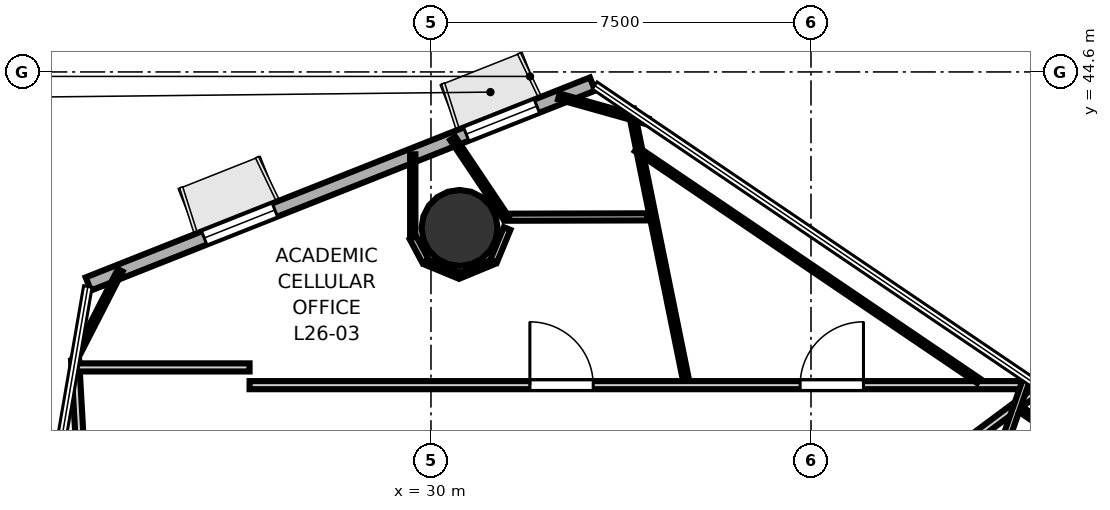
"""IFC4 building model, lengths in metres.
Left out: names, types, materials, properties, quantities, classifications, styles, units other than length and angle.
Written with IfcOpenShell. Run it as: python <this file> out.ifc"""

import sys

from ifc_helpers import new_model, si_unit, direction, frame, frame_2d, origin, origin_2d, place, context, subcontext, project, spatial, rectangle, hollow_circle, extrude, element, fill, save


model = new_model("IFC4")
c1 = context("Model", 3, precision=1e-05, world=origin(), true_north=direction((0.0, 1.0)))
c2 = subcontext(c1, "Body", "Model", "MODEL_VIEW")
j1 = project(units=[si_unit("LENGTHUNIT", "METRE"), si_unit("PLANEANGLEUNIT", "RADIAN")], contexts=[c1])
p1 = place(None, origin())
s1 = spatial("IfcSite", under=j1, at=p1, CompositionType="ELEMENT")
p2 = place(p1, origin())
s2 = spatial("IfcBuilding", under=s1, at=p2, CompositionType="ELEMENT")
p3 = place(p2, frame((0.0, 0.0, 105.2)))
s3 = spatial("IfcBuildingStorey", under=s2, at=p3, CompositionType="ELEMENT", Elevation=105.2)
p4 = place(p3, frame((30.564, 41.521, 0.0), z_axis=(0.0, 0.0, 1.0), x_axis=(1.0, 0.0, 0.0)))
e1 = element("IfcColumn", 1, at=p4, inside=s3, PredefinedType="COLUMN", context=c2, shape_type="SweptSolid", body=[
    extrude(hollow_circle(Radius=0.75, WallThickness=0.036, at=origin_2d()), origin(), (0.0, 0.0, 1.0), 3.7),
])
p5 = place(p3, frame((33.188, 44.361, 0.0), z_axis=(0.0, 0.0, 1.0), x_axis=(-0.929607947385, -0.368549947983, 0.0)))
e2 = element("IfcWall", 2, at=p5, inside=s3, PredefinedType="SOLIDWALL", context=c2, shape_type="SweptSolid", body=[
    extrude(rectangle(XDim=10.705, YDim=0.28, at=frame_2d((5.353, 0.0))), origin(), (0.0, 0.0, 1.0), 3.52),
])
p6 = place(p5, frame((1.181, 0.0, 0.85)))
e3 = element("IfcOpeningElement", 3, at=p6, cuts=e2, PredefinedType="OPENING", context=c2, shape_type="SweptSolid", body=[
    extrude(rectangle(XDim=1.5, YDim=2.1, at=frame_2d((0.75, 1.05))), frame((0.0, 0.15, 0.0), z_axis=(0.0, -1.0, 0.0), x_axis=(1.0, 0.0, 0.0)), (0.0, 0.0, 1.0), 0.3),
])
p7 = place(p5, frame((6.743, 0.0, 0.85)))
e4 = element("IfcOpeningElement", 4, at=p7, cuts=e2, PredefinedType="OPENING", context=c2, shape_type="SweptSolid", body=[
    extrude(rectangle(XDim=1.5, YDim=2.1, at=frame_2d((0.75, 1.05))), frame((0.0, 0.15, 0.0), z_axis=(0.0, -1.0, 0.0), x_axis=(1.0, 0.0, 0.0)), (0.0, 0.0, 1.0), 0.3),
])
p8 = place(p3, frame((23.581, 28.307, 0.0), z_axis=(0.0, 0.0, 1.0), x_axis=(-0.056927299401, 0.998378326379, 0.0)))
e5 = element("IfcWall", 5, at=p8, inside=s3, PredefinedType="PARTITIONING", context=c2, shape_type="SweptSolid", body=[
    extrude(rectangle(XDim=10.615, YDim=0.16, at=frame_2d((5.307, 0.0))), origin(), (0.0, 0.0, 1.0), 2.84),
])
p9 = place(p8, frame((3.594, 0.0, 0.0)))
e6 = element("IfcOpeningElement", 6, at=p9, cuts=e5, PredefinedType="OPENING", context=c2, shape_type="SweptSolid", body=[
    extrude(rectangle(XDim=1.25, YDim=2.2, at=frame_2d((0.625, 1.1))), frame((0.0, 0.09, 0.0), z_axis=(0.0, -1.0, 0.0), x_axis=(1.0, 0.0, 0.0)), (0.0, 0.0, 1.0), 0.18),
])
p10 = place(p3, frame((22.934, 38.769, 0.0), z_axis=(0.0, 0.0, 1.0), x_axis=(1.0, 0.0, 0.0)))
e7 = element("IfcWall", 7, at=p10, inside=s3, PredefinedType="PARTITIONING", context=c2, shape_type="SweptSolid", body=[
    extrude(rectangle(XDim=3.486, YDim=0.16, at=frame_2d((1.743, 0.0))), origin(), (0.0, 0.0, 1.0), 2.84),
])
p11 = place(p3, frame((26.42, 38.419, 0.0), z_axis=(0.0, 0.0, 1.0), x_axis=(1.0, 0.0, 0.0)))
e8 = element("IfcWall", 8, at=p11, inside=s3, PredefinedType="PARTITIONING", context=c2, shape_type="SweptSolid", body=[
    extrude(rectangle(XDim=15.56, YDim=0.16, at=frame_2d((7.78, 0.0))), origin(), (0.0, 0.0, 1.0), 2.84),
])
p12 = place(p11, frame((10.865, 0.0, 0.0)))
e9 = element("IfcOpeningElement", 9, at=p12, cuts=e8, PredefinedType="OPENING", context=c2, shape_type="SweptSolid", body=[
    extrude(rectangle(XDim=1.25, YDim=2.2, at=frame_2d((0.625, 1.1))), frame((0.0, 0.09, 0.0), z_axis=(0.0, -1.0, 0.0), x_axis=(1.0, 0.0, 0.0)), (0.0, 0.0, 1.0), 0.18),
])
p13 = place(p11, frame((5.532, 0.0, 0.0)))
e10 = element("IfcOpeningElement", 10, at=p13, cuts=e8, PredefinedType="OPENING", context=c2, shape_type="SweptSolid", body=[
    extrude(rectangle(XDim=1.25, YDim=2.2, at=frame_2d((0.625, 1.1))), frame((0.0, 0.09, 0.0), z_axis=(0.0, -1.0, 0.0), x_axis=(1.0, 0.0, 0.0)), (0.0, 0.0, 1.0), 0.18),
])
p14 = place(p3, frame((42.053, 38.379, 0.0), z_axis=(0.0, 0.0, 1.0), x_axis=(-0.802246834953, -0.596992475504, 0.0)))
e11 = element("IfcWall", 11, at=p14, inside=s3, PredefinedType="PARTITIONING", context=c2, shape_type="SweptSolid", body=[
    extrude(rectangle(XDim=2.796, YDim=0.16, at=frame_2d((1.398, 0.0))), origin(), (0.0, 0.0, 1.0), 2.84),
])
p15 = place(p3, frame((41.122, 36.72, 0.0), z_axis=(0.0, 0.0, 1.0), x_axis=(0.329225111587, 0.944251463277, 0.0)))
e12 = element("IfcWall", 12, at=p15, inside=s3, PredefinedType="PARTITIONING", context=c2, shape_type="SweptSolid", body=[
    extrude(rectangle(XDim=1.962, YDim=0.14, at=frame_2d((0.981, 0.0))), origin(), (0.0, 0.0, 1.0), 2.84),
])
p16 = place(p3, frame((41.65, 37.933, 0.0), z_axis=(0.0, 0.0, 1.0), x_axis=(0.827941747022, -0.560814107827, 0.0)))
e13 = element("IfcWall", 13, at=p16, inside=s3, PredefinedType="PARTITIONING", context=c2, shape_type="SweptSolid", body=[
    extrude(rectangle(XDim=11.895, YDim=0.12, at=frame_2d((5.948, 0.0))), origin(), (0.0, 0.0, 1.0), 2.84),
])
p17 = place(p3, frame((35.029, 38.536, 0.0), z_axis=(0.0, 0.0, 1.0), x_axis=(-0.198965568746, 0.980006480822, 0.0)))
e14 = element("IfcWall", 14, at=p17, inside=s3, PredefinedType="PARTITIONING", context=c2, shape_type="SweptSolid", body=[
    extrude(rectangle(XDim=5.436, YDim=0.12, at=frame_2d((2.718, 0.0))), origin(), (0.0, 0.0, 1.0), 2.84),
])
p18 = place(p3, frame((34.052, 43.08, 0.0), z_axis=(0.0, 0.0, 1.0), x_axis=(0.827934826591, -0.560824324471, 0.0)))
e15 = element("IfcWall", 15, at=p18, inside=s3, PredefinedType="PARTITIONING", context=c2, shape_type="SweptSolid", body=[
    extrude(rectangle(XDim=8.158, YDim=0.105, at=frame_2d((4.079, 0.0))), origin(), (0.0, 0.0, 1.0), 2.84),
])
p19 = place(p3, frame((22.988, 38.968, 0.0), z_axis=(0.0, 0.0, 1.0), x_axis=(0.456105833623, 0.889925541006, 0.0)))
e16 = element("IfcWall", 16, at=p19, inside=s3, PredefinedType="PARTITIONING", context=c2, shape_type="SweptSolid", body=[
    extrude(rectangle(XDim=1.928, YDim=0.105, at=frame_2d((0.964, 0.0))), origin(), (0.0, 0.0, 1.0), 2.84),
])
p20 = place(p3, frame((32.524, 44.115, 0.0), z_axis=(0.0, 0.0, 1.0), x_axis=(0.962878976212, -0.269933468042, 0.0)))
e17 = element("IfcWall", 17, at=p20, inside=s3, PredefinedType="PARTITIONING", context=c2, shape_type="SweptSolid", body=[
    extrude(rectangle(XDim=1.82, YDim=0.12, at=frame_2d((0.91, 0.0))), origin(), (0.0, 0.0, 1.0), 2.84),
])
p21 = place(p3, frame((34.267, 41.74, 0.0), z_axis=(0.0, 0.0, 1.0), x_axis=(-0.999996830361, -0.002517790248, 0.0)))
e18 = element("IfcWall", 18, at=p21, inside=s3, PredefinedType="PARTITIONING", context=c2, shape_type="SweptSolid", body=[
    extrude(rectangle(XDim=2.812, YDim=0.14, at=frame_2d((1.406, 0.0))), origin(), (0.0, 0.0, 1.0), 2.84),
])
p22 = place(p3, frame((31.481, 41.719, 0.0), z_axis=(0.0, 0.0, 1.0), x_axis=(-0.556846029643, 0.830615735025, 0.0)))
e19 = element("IfcWall", 19, at=p22, inside=s3, PredefinedType="PARTITIONING", context=c2, shape_type="SweptSolid", body=[
    extrude(rectangle(XDim=1.889, YDim=0.12, at=frame_2d((0.944, 0.0))), origin(), (0.0, 0.0, 1.0), 2.84),
])
p23 = place(p3, frame((29.64, 42.974, 0.0), z_axis=(0.0, 0.0, 1.0), x_axis=(0.0, -1.0, 0.0)))
e20 = element("IfcWall", 20, at=p23, inside=s3, PredefinedType="PARTITIONING", context=c2, shape_type="SweptSolid", body=[
    extrude(rectangle(XDim=1.631, YDim=0.105, at=frame_2d((0.815, 0.0))), origin(), (0.0, 0.0, 1.0), 2.84),
])
p24 = place(p3, frame((29.644, 41.329, 0.0), z_axis=(0.0, 0.0, 1.0), x_axis=(0.471618839574, -0.881802511994, 0.0)))
e21 = element("IfcWall", 21, at=p24, inside=s3, PredefinedType="PARTITIONING", context=c2, shape_type="SweptSolid", body=[
    extrude(rectangle(XDim=0.529, YDim=0.14, at=frame_2d((0.264, 0.0))), origin(), (0.0, 0.0, 1.0), 2.84),
])
p25 = place(p3, frame((29.909, 40.849, 0.0), z_axis=(0.0, 0.0, 1.0), x_axis=(0.923935648299, -0.382547928764, 0.0)))
e22 = element("IfcWall", 22, at=p25, inside=s3, PredefinedType="PARTITIONING", context=c2, shape_type="SweptSolid", body=[
    extrude(rectangle(XDim=0.696, YDim=0.12, at=frame_2d((0.348, 0.0))), origin(), (0.0, 0.0, 1.0), 2.84),
])
p26 = place(p3, frame((30.576, 40.583, 0.0), z_axis=(0.0, 0.0, 1.0), x_axis=(0.923935648299, 0.382547928764, 0.0)))
e23 = element("IfcWall", 23, at=p26, inside=s3, PredefinedType="PARTITIONING", context=c2, shape_type="SweptSolid", body=[
    extrude(rectangle(XDim=0.696, YDim=0.105, at=frame_2d((0.348, 0.0))), origin(), (0.0, 0.0, 1.0), 2.84),
])
p27 = place(p3, frame((31.236, 40.866, 0.0), z_axis=(0.0, 0.0, 1.0), x_axis=(0.381929177829, 0.92419159438, 0.0)))
e24 = element("IfcWall", 24, at=p27, inside=s3, PredefinedType="PARTITIONING", context=c2, shape_type="SweptSolid", body=[
    extrude(rectangle(XDim=0.698, YDim=0.14, at=frame_2d((0.349, 0.0))), origin(), (0.0, 0.0, 1.0), 2.84),
])
p28 = place(p12, origin())
e25 = element("IfcDoor", 25, at=p28, inside=s3, OperationType="SINGLE_SWING_RIGHT", PredefinedType="DOOR", context=c2, shape_type="SweptSolid", body=[
    extrude(rectangle(XDim=1.25, YDim=2.2, at=frame_2d((0.625, 1.1))), frame((0.0, 0.025, 0.0), z_axis=(0.0, -1.0, 0.0), x_axis=(1.0, 0.0, 0.0)), (0.0, 0.0, 1.0), 0.05),
])
fill(e9, e25)
p29 = place(p13, origin())
e26 = element("IfcDoor", 26, at=p29, inside=s3, OperationType="SINGLE_SWING_LEFT", PredefinedType="DOOR", context=c2, shape_type="SweptSolid", body=[
    extrude(rectangle(XDim=1.25, YDim=2.2, at=frame_2d((0.625, 1.1))), frame((0.0, 0.025, 0.0), z_axis=(0.0, -1.0, 0.0), x_axis=(1.0, 0.0, 0.0)), (0.0, 0.0, 1.0), 0.05),
])
fill(e10, e26)
p30 = place(p6, origin())
e27 = element("IfcWindow", 27, at=p30, inside=s3, PartitioningType="SINGLE_PANEL", PredefinedType="WINDOW", context=c2, shape_type="SweptSolid", body=[
    extrude(rectangle(XDim=1.5, YDim=2.1, at=frame_2d((0.75, 1.05))), frame((0.0, 0.03, 0.0), z_axis=(0.0, -1.0, 0.0), x_axis=(1.0, 0.0, 0.0)), (0.0, 0.0, 1.0), 0.06),
])
fill(e3, e27)
p31 = place(p7, origin())
e28 = element("IfcWindow", 28, at=p31, inside=s3, PartitioningType="SINGLE_PANEL", PredefinedType="WINDOW", context=c2, shape_type="SweptSolid", body=[
    extrude(rectangle(XDim=1.5, YDim=2.1, at=frame_2d((0.75, 1.05))), frame((0.0, 0.03, 0.0), z_axis=(0.0, -1.0, 0.0), x_axis=(1.0, 0.0, 0.0)), (0.0, 0.0, 1.0), 0.06),
])
fill(e4, e28)
save(model, sys.argv[1])
